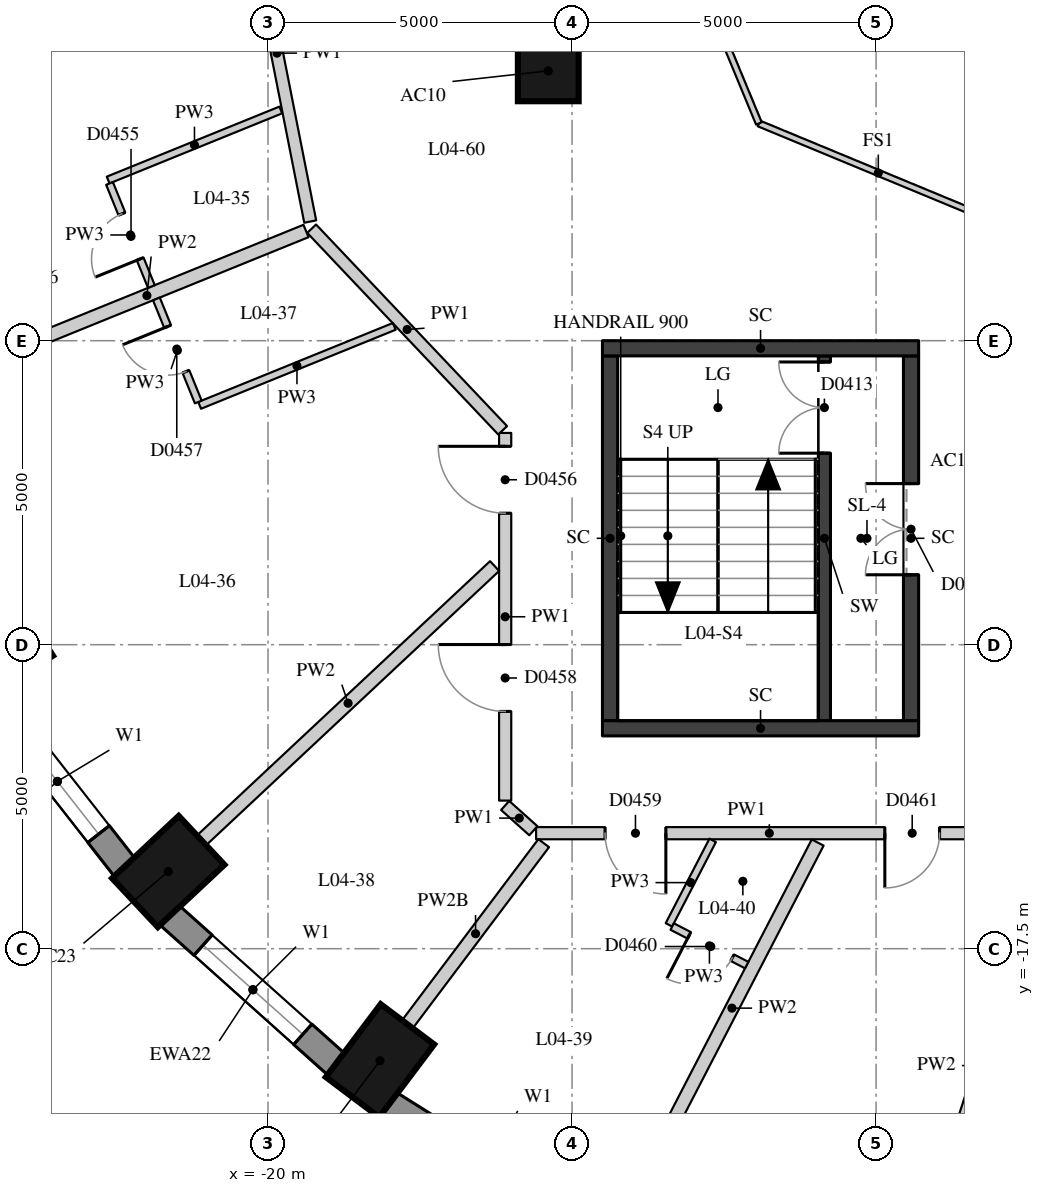
"""IFC4 building model, lengths in metres.
Left out: names, types, materials, properties, quantities, classifications, styles, units other than length and angle.
Written with IfcOpenShell. Run it as: python <this file> out.ifc"""

import sys

from ifc_helpers import new_model, si_unit, direction, frame, frame_2d, origin, origin_2d, place, context, subcontext, project, spatial, rectangle, extrude, element, fill, save


model = new_model("IFC4")
c1 = context("Model", 3, precision=1e-05, world=origin(), true_north=direction((0.0, 1.0)))
c2 = subcontext(c1, "Body", "Model", "MODEL_VIEW")
j1 = project(units=[si_unit("LENGTHUNIT", "METRE"), si_unit("PLANEANGLEUNIT", "RADIAN")], contexts=[c1])
p1 = place(None, origin())
s1 = spatial("IfcSite", under=j1, at=p1, CompositionType="ELEMENT")
p2 = place(p1, origin())
s2 = spatial("IfcBuilding", under=s1, at=p2, CompositionType="ELEMENT")
p3 = place(p2, frame((0.0, 0.0, 21.7)))
s3 = spatial("IfcBuildingStorey", under=s2, at=p3, CompositionType="ELEMENT", Elevation=21.7)
for number, where, z_axis, x_axis in (
    (1, (-24.465, -12.625, 0.0), (0.0, 0.0, 1.0), (-0.841, -0.541, 0.0)),
    (2, (-21.641, -16.23, 0.0), (0.0, 0.0, 1.0), (-0.73, -0.683, 0.0)),
    (3, (-18.159, -19.343, 0.0), (0.0, 0.0, 1.0), (-0.601, -0.799, 0.0)),
):
    element("IfcColumn", number, at=place(p3, frame(where, z_axis=z_axis, x_axis=x_axis)), inside=s3, PredefinedType="COLUMN", context=c2, shape_type="SweptSolid", body=[
        extrude(rectangle(XDim=1.5, YDim=1.1, at=origin_2d()), origin(), (0.0, 0.0, 1.0), 3.3),
    ])
p4 = place(p3, frame((-15.391, -3.062, 0.0), z_axis=(0.0, 0.0, 1.0), x_axis=(1.0, 0.0, 0.0)))
e4 = element("IfcColumn", 4, at=p4, inside=s3, PredefinedType="COLUMN", context=c2, shape_type="SweptSolid", body=[
    extrude(rectangle(XDim=1.0, YDim=1.0, at=origin_2d()), origin(), (0.0, 0.0, 1.0), 3.3),
])
p5 = place(p3, frame((-24.578, -13.328, 0.0), z_axis=(0.0, 0.0, 1.0), x_axis=(0.616661975264, -0.787228053529, 0.0)))
e5 = element("IfcWall", 5, at=p5, inside=s3, PredefinedType="SOLIDWALL", context=c2, shape_type="SweptSolid", body=[
    extrude(rectangle(XDim=3.61, YDim=0.45, at=frame_2d((1.805, 0.0))), origin(), (0.0, 0.0, 1.0), 3.02),
])
p6 = place(p5, frame((0.705, 0.0, 0.4)))
e6 = element("IfcOpeningElement", 6, at=p6, cuts=e5, PredefinedType="OPENING", context=c2, shape_type="SweptSolid", body=[
    extrude(rectangle(XDim=2.2, YDim=1.75, at=frame_2d((1.1, 0.875))), frame((0.0, 0.235, 0.0), z_axis=(0.0, -1.0, 0.0), x_axis=(1.0, 0.0, 0.0)), (0.0, 0.0, 1.0), 0.47),
])
p7 = place(p3, frame((-21.627, -16.943, 0.0), z_axis=(0.0, 0.0, 1.0), x_axis=(0.745526233716, -0.66647628228, 0.0)))
e7 = element("IfcWall", 7, at=p7, inside=s3, PredefinedType="SOLIDWALL", context=c2, shape_type="SweptSolid", body=[
    extrude(rectangle(XDim=3.697, YDim=0.45, at=frame_2d((1.848, 0.0))), origin(), (0.0, 0.0, 1.0), 3.02),
])
p8 = place(p7, frame((0.749, 0.0, 0.4)))
e8 = element("IfcOpeningElement", 8, at=p8, cuts=e7, PredefinedType="OPENING", context=c2, shape_type="SweptSolid", body=[
    extrude(rectangle(XDim=2.2, YDim=1.75, at=frame_2d((1.1, 0.875))), frame((0.0, 0.235, 0.0), z_axis=(0.0, -1.0, 0.0), x_axis=(1.0, 0.0, 0.0)), (0.0, 0.0, 1.0), 0.47),
])
p9 = place(p3, frame((-18.023, -20.044, 0.0), z_axis=(0.0, 0.0, 1.0), x_axis=(0.847635480093, -0.530579016629, 0.0)))
e9 = element("IfcWall", 9, at=p9, inside=s3, PredefinedType="SOLIDWALL", context=c2, shape_type="SweptSolid", body=[
    extrude(rectangle(XDim=3.782, YDim=0.45, at=frame_2d((1.891, 0.0))), origin(), (0.0, 0.0, 1.0), 3.02),
])
p10 = place(p9, frame((0.791, 0.0, 0.4)))
e10 = element("IfcOpeningElement", 10, at=p10, cuts=e9, PredefinedType="OPENING", context=c2, shape_type="SweptSolid", body=[
    extrude(rectangle(XDim=2.2, YDim=1.75, at=frame_2d((1.1, 0.875))), frame((0.0, 0.235, 0.0), z_axis=(0.0, -1.0, 0.0), x_axis=(1.0, 0.0, 0.0)), (0.0, 0.0, 1.0), 0.47),
])
p11 = place(p3, frame((-10.85, -13.75, 0.0), z_axis=(0.0, 0.0, 1.0), x_axis=(0.0, 1.0, 0.0)))
e11 = element("IfcWall", 11, at=p11, inside=s3, PredefinedType="SHEAR", context=c2, shape_type="SweptSolid", body=[
    extrude(rectangle(XDim=6.0, YDim=0.2, at=frame_2d((3.0, 0.0))), origin(), (0.0, 0.0, 1.0), 3.02),
])
p12 = place(p11, frame((4.4, 0.0, 0.0)))
e12 = element("IfcOpeningElement", 12, at=p12, cuts=e11, PredefinedType="OPENING", context=c2, shape_type="SweptSolid", body=[
    extrude(rectangle(XDim=1.5, YDim=2.1, at=frame_2d((0.75, 1.05))), frame((0.0, 0.11, 0.0), z_axis=(0.0, -1.0, 0.0), x_axis=(1.0, 0.0, 0.0)), (0.0, 0.0, 1.0), 0.22),
])
p13 = place(p3, frame((-14.375, -13.75, -0.28), z_axis=(0.0, 0.0, 1.0), x_axis=(0.0, 1.0, 0.0)))
e13 = element("IfcWall", 13, at=p13, inside=s3, PredefinedType="SHEAR", context=c2, shape_type="SweptSolid", body=[
    extrude(rectangle(XDim=6.0, YDim=0.25, at=frame_2d((3.0, 0.0))), origin(), (0.0, 0.0, 1.0), 3.3),
])
p14 = place(p3, frame((-9.425, -13.75, -0.28), z_axis=(0.0, 0.0, 1.0), x_axis=(0.0, 1.0, 0.0)))
e14 = element("IfcWall", 14, at=p14, inside=s3, PredefinedType="SHEAR", context=c2, shape_type="SweptSolid", body=[
    extrude(rectangle(XDim=6.0, YDim=0.25, at=frame_2d((3.0, 0.0))), origin(), (0.0, 0.0, 1.0), 3.3),
])
p15 = place(p14, frame((2.4, 0.0, 0.28)))
e15 = element("IfcOpeningElement", 15, at=p15, cuts=e14, PredefinedType="OPENING", context=c2, shape_type="SweptSolid", body=[
    extrude(rectangle(XDim=1.5, YDim=2.1, at=frame_2d((0.75, 1.05))), frame((0.0, 0.135, 0.0), z_axis=(0.0, -1.0, 0.0), x_axis=(1.0, 0.0, 0.0)), (0.0, 0.0, 1.0), 0.27),
])
for number, where, z_axis, x_axis in (
    (16, (-14.5, -7.625, -0.28), (0.0, 0.0, 1.0), (1.0, 0.0, 0.0)),
    (17, (-14.5, -13.875, -0.28), (0.0, 0.0, 1.0), (1.0, 0.0, 0.0)),
):
    element("IfcWall", number, at=place(p3, frame(where, z_axis=z_axis, x_axis=x_axis)), inside=s3, PredefinedType="SHEAR", context=c2, shape_type="SweptSolid", body=[
        extrude(rectangle(XDim=5.2, YDim=0.25, at=frame_2d((2.6, 0.0))), origin(), (0.0, 0.0, 1.0), 3.3),
    ])
p16 = place(p3, frame((-7.92, -15.6, 0.0), z_axis=(0.0, 0.0, 1.0), x_axis=(-1.0, 0.0, 0.0)))
e18 = element("IfcWall", 18, at=p16, inside=s3, PredefinedType="PARTITIONING", context=c2, shape_type="SweptSolid", body=[
    extrude(rectangle(XDim=7.672, YDim=0.2, at=frame_2d((3.836, 0.0))), origin(), (0.0, 0.0, 1.0), 3.02),
])
p17 = place(p16, frame((5.537, 0.0, 0.0)))
e19 = element("IfcOpeningElement", 19, at=p17, cuts=e18, PredefinedType="OPENING", context=c2, shape_type="SweptSolid", body=[
    extrude(rectangle(XDim=1.0, YDim=2.1, at=frame_2d((0.5, 1.05))), frame((0.0, 0.11, 0.0), z_axis=(0.0, -1.0, 0.0), x_axis=(1.0, 0.0, 0.0)), (0.0, 0.0, 1.0), 0.22),
])
p18 = place(p16, frame((1.036, 0.0, 0.0)))
e20 = element("IfcOpeningElement", 20, at=p18, cuts=e18, PredefinedType="OPENING", context=c2, shape_type="SweptSolid", body=[
    extrude(rectangle(XDim=0.9, YDim=2.1, at=frame_2d((0.45, 1.05))), frame((0.0, 0.11, 0.0), z_axis=(0.0, -1.0, 0.0), x_axis=(1.0, 0.0, 0.0)), (0.0, 0.0, 1.0), 0.22),
])
p19 = place(p3, frame((-15.636, -15.56, 0.0), z_axis=(0.0, 0.0, 1.0), x_axis=(-0.744656758283, 0.667447610187, 0.0)))
e21 = element("IfcWall", 21, at=p19, inside=s3, PredefinedType="PARTITIONING", context=c2, shape_type="SweptSolid", body=[
    extrude(rectangle(XDim=0.623, YDim=0.2, at=frame_2d((0.312, 0.0))), origin(), (0.0, 0.0, 1.0), 3.02),
])
p20 = place(p3, frame((-16.1, -15.064, 0.0), z_axis=(0.0, 0.0, 1.0), x_axis=(0.0, 1.0, 0.0)))
e22 = element("IfcWall", 22, at=p20, inside=s3, PredefinedType="PARTITIONING", context=c2, shape_type="SweptSolid", body=[
    extrude(rectangle(XDim=6.047, YDim=0.2, at=frame_2d((3.023, 0.0))), origin(), (0.0, 0.0, 1.0), 3.02),
])
p21 = place(p20, frame((4.727, 0.0, 0.0)))
e23 = element("IfcOpeningElement", 23, at=p21, cuts=e22, PredefinedType="OPENING", context=c2, shape_type="SweptSolid", body=[
    extrude(rectangle(XDim=1.1, YDim=2.1, at=frame_2d((0.55, 1.05))), frame((0.0, 0.11, 0.0), z_axis=(0.0, -1.0, 0.0), x_axis=(1.0, 0.0, 0.0)), (0.0, 0.0, 1.0), 0.22),
])
p22 = place(p20, frame((1.467, 0.0, 0.0)))
e24 = element("IfcOpeningElement", 24, at=p22, cuts=e22, PredefinedType="OPENING", context=c2, shape_type="SweptSolid", body=[
    extrude(rectangle(XDim=1.1, YDim=2.1, at=frame_2d((0.55, 1.05))), frame((0.0, 0.11, 0.0), z_axis=(0.0, -1.0, 0.0), x_axis=(1.0, 0.0, 0.0)), (0.0, 0.0, 1.0), 0.22),
])
p23 = place(p3, frame((-16.141, -8.974, 0.0), z_axis=(0.0, 0.0, 1.0), x_axis=(-0.687741683024, 0.725955492735, 0.0)))
e25 = element("IfcWall", 25, at=p23, inside=s3, PredefinedType="PARTITIONING", context=c2, shape_type="SweptSolid", body=[
    extrude(rectangle(XDim=4.568, YDim=0.2, at=frame_2d((2.284, 0.0))), origin(), (0.0, 0.0, 1.0), 3.02),
])
p24 = place(p3, frame((-19.306, -5.541, 0.0), z_axis=(0.0, 0.0, 1.0), x_axis=(-0.193671356151, 0.981066463501, 0.0)))
e26 = element("IfcWall", 26, at=p24, inside=s3, PredefinedType="PARTITIONING", context=c2, shape_type="SweptSolid", body=[
    extrude(rectangle(XDim=5.647, YDim=0.2, at=frame_2d((2.824, 0.0))), origin(), (0.0, 0.0, 1.0), 3.02),
])
p25 = place(p3, frame((-24.608, -7.82, 0.0), z_axis=(0.0, 0.0, 1.0), x_axis=(0.926565467624, 0.376133532415, 0.0)))
e27 = element("IfcWall", 27, at=p25, inside=s3, PredefinedType="PARTITIONING", context=c2, shape_type="SweptSolid", body=[
    extrude(rectangle(XDim=5.648, YDim=0.22, at=frame_2d((2.824, 0.0))), origin(), (0.0, 0.0, 1.0), 3.02),
])
p26 = place(p3, frame((-21.093, -15.718, 0.0), z_axis=(0.0, 0.0, 1.0), x_axis=(0.73009284205, 0.683347965525, 0.0)))
e28 = element("IfcWall", 28, at=p26, inside=s3, PredefinedType="PARTITIONING", context=c2, shape_type="SweptSolid", body=[
    extrude(rectangle(XDim=6.602, YDim=0.22, at=frame_2d((3.301, 0.0))), origin(), (0.0, 0.0, 1.0), 3.02),
])
p27 = place(p3, frame((-17.708, -18.743, 0.0), z_axis=(0.0, 0.0, 1.0), x_axis=(0.601172757903, 0.799119086967, 0.0)))
e29 = element("IfcWall", 29, at=p27, inside=s3, PredefinedType="PARTITIONING", context=c2, shape_type="SweptSolid", body=[
    extrude(rectangle(XDim=3.729, YDim=0.22, at=frame_2d((1.864, 0.0))), origin(), (0.0, 0.0, 1.0), 2.57),
])
p28 = place(p3, frame((-13.78, -21.201, 0.0), z_axis=(0.0, 0.0, 1.0), x_axis=(0.459699000582, 0.888074787878, 0.0)))
e30 = element("IfcWall", 30, at=p28, inside=s3, PredefinedType="PARTITIONING", context=c2, shape_type="SweptSolid", body=[
    extrude(rectangle(XDim=6.134, YDim=0.22, at=frame_2d((3.067, 0.0))), origin(), (0.0, 0.0, 1.0), 3.02),
])
p29 = place(p3, frame((-9.429, -23.014, 0.0), z_axis=(0.0, 0.0, 1.0), x_axis=(0.310261176215, 0.950651356983, 0.0)))
e31 = element("IfcWall", 31, at=p29, inside=s3, PredefinedType="PARTITIONING", context=c2, shape_type="SweptSolid", body=[
    extrude(rectangle(XDim=7.557, YDim=0.22, at=frame_2d((3.779, 0.0))), origin(), (0.0, 0.0, 1.0), 3.02),
])
p30 = place(p3, frame((-19.79, -3.705, 0.0), z_axis=(0.0, 0.0, 1.0), x_axis=(-0.926585481443, -0.37608422671, 0.0)))
e32 = element("IfcWall", 32, at=p30, inside=s3, PredefinedType="PARTITIONING", context=c2, shape_type="SweptSolid", body=[
    extrude(rectangle(XDim=3.064, YDim=0.12, at=frame_2d((1.532, 0.0))), origin(), (0.0, 0.0, 1.0), 3.02),
])
p31 = place(p3, frame((-17.924, -7.264, 0.0), z_axis=(0.0, 0.0, 1.0), x_axis=(-0.926548953408, -0.376174210891, 0.0)))
e33 = element("IfcWall", 33, at=p31, inside=s3, PredefinedType="PARTITIONING", context=c2, shape_type="SweptSolid", body=[
    extrude(rectangle(XDim=3.455, YDim=0.12, at=frame_2d((1.727, 0.0))), origin(), (0.0, 0.0, 1.0), 3.02),
])
p32 = place(p3, frame((-12.687, -15.718, 0.0), z_axis=(0.0, 0.0, 1.0), x_axis=(-0.459775159711, -0.888035361071, 0.0)))
e34 = element("IfcWall", 34, at=p32, inside=s3, PredefinedType="PARTITIONING", context=c2, shape_type="SweptSolid", body=[
    extrude(rectangle(XDim=1.565, YDim=0.12, at=frame_2d((0.782, 0.0))), origin(), (0.0, 0.0, 1.0), 3.02),
])
p33 = place(p3, frame((-22.607, -4.913, 0.0), z_axis=(0.0, 0.0, 1.0), x_axis=(0.376216010002, -0.92653198208, 0.0)))
e35 = element("IfcWall", 35, at=p33, inside=s3, PredefinedType="PARTITIONING", context=c2, shape_type="SweptSolid", body=[
    extrude(rectangle(XDim=1.83, YDim=0.12, at=frame_2d((0.915, 0.0))), origin(), (0.0, 0.0, 1.0), 3.02),
])
p34 = place(p33, frame((0.54, 0.0, 0.0)))
e36 = element("IfcOpeningElement", 36, at=p34, cuts=e35, PredefinedType="OPENING", context=c2, shape_type="SweptSolid", body=[
    extrude(rectangle(XDim=0.8, YDim=2.1, at=frame_2d((0.4, 1.05))), frame((0.0, 0.07, 0.0), z_axis=(0.0, -1.0, 0.0), x_axis=(1.0, 0.0, 0.0)), (0.0, 0.0, 1.0), 0.14),
])
p35 = place(p3, frame((-21.147, -8.508, 0.0), z_axis=(0.0, 0.0, 1.0), x_axis=(-0.376216010002, 0.92653198208, 0.0)))
e37 = element("IfcWall", 37, at=p35, inside=s3, PredefinedType="PARTITIONING", context=c2, shape_type="SweptSolid", body=[
    extrude(rectangle(XDim=1.83, YDim=0.12, at=frame_2d((0.915, 0.0))), origin(), (0.0, 0.0, 1.0), 3.02),
])
p36 = place(p35, frame((0.54, 0.0, 0.0)))
e38 = element("IfcOpeningElement", 38, at=p36, cuts=e37, PredefinedType="OPENING", context=c2, shape_type="SweptSolid", body=[
    extrude(rectangle(XDim=0.8, YDim=2.1, at=frame_2d((0.4, 1.05))), frame((0.0, 0.07, 0.0), z_axis=(0.0, -1.0, 0.0), x_axis=(1.0, 0.0, 0.0)), (0.0, 0.0, 1.0), 0.14),
])
p37 = place(p3, frame((-13.353, -17.135, 0.0), z_axis=(0.0, 0.0, 1.0), x_axis=(0.888075681402, -0.459697274413, 0.0)))
e39 = element("IfcWall", 39, at=p37, inside=s3, PredefinedType="PARTITIONING", context=c2, shape_type="SweptSolid", body=[
    extrude(rectangle(XDim=1.38, YDim=0.12, at=frame_2d((0.69, 0.0))), origin(), (0.0, 0.0, 1.0), 3.02),
])
p38 = place(p37, frame((0.315, 0.0, 0.0)))
e40 = element("IfcOpeningElement", 40, at=p38, cuts=e39, PredefinedType="OPENING", context=c2, shape_type="SweptSolid", body=[
    extrude(rectangle(XDim=0.8, YDim=2.1, at=frame_2d((0.4, 1.05))), frame((0.0, 0.07, 0.0), z_axis=(0.0, -1.0, 0.0), x_axis=(1.0, 0.0, 0.0)), (0.0, 0.0, 1.0), 0.14),
])
for number, where, z_axis, x_axis in (
    (41, (-8.0, -5.554, 0.0), (0.0, 0.0, 1.0), (-0.924, 0.383, 0.0)),
    (42, (-11.927, -3.927, 0.0), (0.0, 0.0, 1.0), (-0.383, 0.924, 0.0)),
):
    element("IfcWall", number, at=place(p3, frame(where, z_axis=z_axis, x_axis=x_axis)), inside=s3, PredefinedType="PARTITIONING", context=c2, shape_type="SweptSolid", body=[
        extrude(rectangle(XDim=4.251, YDim=0.1, at=frame_2d((2.125, 0.0))), origin(), (0.0, 0.0, 1.0), 3.02),
    ])
p39 = place(p6, origin())
e43 = element("IfcWindow", 43, at=p39, inside=s3, PartitioningType="SINGLE_PANEL", PredefinedType="WINDOW", context=c2, shape_type="SweptSolid", body=[
    extrude(rectangle(XDim=2.2, YDim=1.75, at=frame_2d((1.1, 0.875))), frame((0.0, 0.035, 0.0), z_axis=(0.0, -1.0, 0.0), x_axis=(1.0, 0.0, 0.0)), (0.0, 0.0, 1.0), 0.06),
])
fill(e6, e43)
p40 = place(p8, origin())
e44 = element("IfcWindow", 44, at=p40, inside=s3, PartitioningType="SINGLE_PANEL", PredefinedType="WINDOW", context=c2, shape_type="SweptSolid", body=[
    extrude(rectangle(XDim=2.2, YDim=1.75, at=frame_2d((1.1, 0.875))), frame((0.0, 0.035, 0.0), z_axis=(0.0, -1.0, 0.0), x_axis=(1.0, 0.0, 0.0)), (0.0, 0.0, 1.0), 0.06),
])
fill(e8, e44)
p41 = place(p12, origin())
e45 = element("IfcDoor", 45, at=p41, inside=s3, OperationType="DOUBLE_DOOR_SINGLE_SWING", PredefinedType="DOOR", context=c2, shape_type="SweptSolid", body=[
    extrude(rectangle(XDim=1.5, YDim=2.1, at=frame_2d((0.75, 1.05))), frame((0.0, 0.025, 0.0), z_axis=(0.0, -1.0, 0.0), x_axis=(1.0, 0.0, 0.0)), (0.0, 0.0, 1.0), 0.05),
])
fill(e12, e45)
p42 = place(p15, origin())
e46 = element("IfcDoor", 46, at=p42, inside=s3, OperationType="DOUBLE_DOOR_SINGLE_SWING", PredefinedType="DOOR", context=c2, shape_type="SweptSolid", body=[
    extrude(rectangle(XDim=1.5, YDim=2.1, at=frame_2d((0.75, 1.05))), frame((0.0, 0.025, 0.0), z_axis=(0.0, -1.0, 0.0), x_axis=(1.0, 0.0, 0.0)), (0.0, 0.0, 1.0), 0.05),
])
fill(e15, e46)
p43 = place(p34, origin())
e47 = element("IfcDoor", 47, at=p43, inside=s3, OperationType="SINGLE_SWING_LEFT", PredefinedType="DOOR", context=c2, shape_type="SweptSolid", body=[
    extrude(rectangle(XDim=0.8, YDim=2.1, at=frame_2d((0.4, 1.05))), frame((0.0, 0.025, 0.0), z_axis=(0.0, -1.0, 0.0), x_axis=(1.0, 0.0, 0.0)), (0.0, 0.0, 1.0), 0.05),
])
fill(e36, e47)
p44 = place(p21, origin())
e48 = element("IfcDoor", 48, at=p44, inside=s3, OperationType="SINGLE_SWING_RIGHT", PredefinedType="DOOR", context=c2, shape_type="SweptSolid", body=[
    extrude(rectangle(XDim=1.1, YDim=2.1, at=frame_2d((0.55, 1.05))), frame((0.0, 0.025, 0.0), z_axis=(0.0, -1.0, 0.0), x_axis=(1.0, 0.0, 0.0)), (0.0, 0.0, 1.0), 0.05),
])
fill(e23, e48)
p45 = place(p36, origin())
e49 = element("IfcDoor", 49, at=p45, inside=s3, OperationType="SINGLE_SWING_RIGHT", PredefinedType="DOOR", context=c2, shape_type="SweptSolid", body=[
    extrude(rectangle(XDim=0.8, YDim=2.1, at=frame_2d((0.4, 1.05))), frame((0.0, 0.025, 0.0), z_axis=(0.0, -1.0, 0.0), x_axis=(1.0, 0.0, 0.0)), (0.0, 0.0, 1.0), 0.05),
])
fill(e38, e49)
p46 = place(p22, origin())
e50 = element("IfcDoor", 50, at=p46, inside=s3, OperationType="SINGLE_SWING_RIGHT", PredefinedType="DOOR", context=c2, shape_type="SweptSolid", body=[
    extrude(rectangle(XDim=1.1, YDim=2.1, at=frame_2d((0.55, 1.05))), frame((0.0, 0.025, 0.0), z_axis=(0.0, -1.0, 0.0), x_axis=(1.0, 0.0, 0.0)), (0.0, 0.0, 1.0), 0.05),
])
fill(e24, e50)
p47 = place(p17, origin())
e51 = element("IfcDoor", 51, at=p47, inside=s3, OperationType="SINGLE_SWING_LEFT", PredefinedType="DOOR", context=c2, shape_type="SweptSolid", body=[
    extrude(rectangle(XDim=1.0, YDim=2.1, at=frame_2d((0.5, 1.05))), frame((0.0, 0.025, 0.0), z_axis=(0.0, -1.0, 0.0), x_axis=(1.0, 0.0, 0.0)), (0.0, 0.0, 1.0), 0.05),
])
fill(e19, e51)
p48 = place(p38, origin())
e52 = element("IfcDoor", 52, at=p48, inside=s3, OperationType="SINGLE_SWING_RIGHT", PredefinedType="DOOR", context=c2, shape_type="SweptSolid", body=[
    extrude(rectangle(XDim=0.8, YDim=2.1, at=frame_2d((0.4, 1.05))), frame((0.0, 0.025, 0.0), z_axis=(0.0, -1.0, 0.0), x_axis=(1.0, 0.0, 0.0)), (0.0, 0.0, 1.0), 0.05),
])
fill(e40, e52)
p49 = place(p18, origin())
e53 = element("IfcDoor", 53, at=p49, inside=s3, OperationType="SINGLE_SWING_RIGHT", PredefinedType="DOOR", context=c2, shape_type="SweptSolid", body=[
    extrude(rectangle(XDim=0.9, YDim=2.1, at=frame_2d((0.45, 1.05))), frame((0.0, 0.025, 0.0), z_axis=(0.0, -1.0, 0.0), x_axis=(1.0, 0.0, 0.0)), (0.0, 0.0, 1.0), 0.05),
])
fill(e20, e53)
save(model, sys.argv[1])
